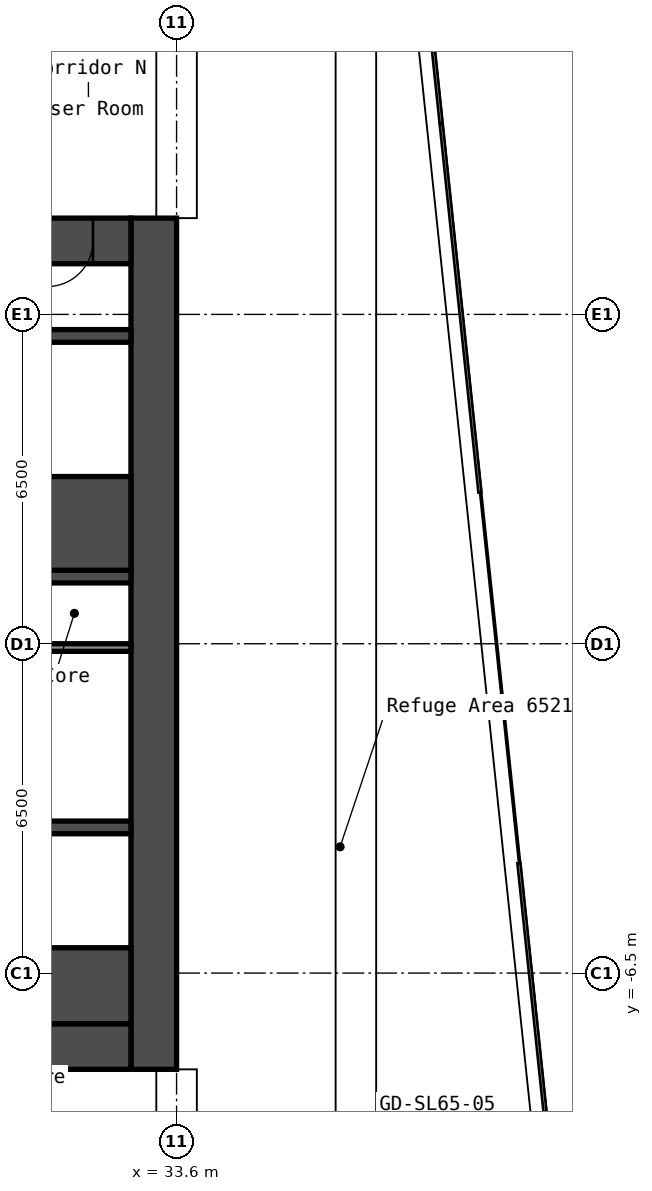
"""IFC4 building model, lengths in metres.
Left out: names, types, materials, properties, quantities, classifications, styles, units other than length and angle.
Written with IfcOpenShell. Run it as: python <this file> out.ifc"""

import sys

from ifc_helpers import new_model, si_unit, direction, frame, frame_2d, origin, place, context, subcontext, project, spatial, rectangle, extrude, element, fill, save


model = new_model("IFC4")
c1 = context("Model", 3, precision=1e-05, world=origin(), true_north=direction((0.0, 1.0)))
c2 = subcontext(c1, "Body", "Model", "MODEL_VIEW")
j1 = project(units=[si_unit("LENGTHUNIT", "METRE"), si_unit("PLANEANGLEUNIT", "RADIAN")], contexts=[c1])
p1 = place(None, origin())
s1 = spatial("IfcSite", under=j1, at=p1, CompositionType="ELEMENT")
p2 = place(p1, origin())
s2 = spatial("IfcBuilding", under=s1, at=p2, CompositionType="ELEMENT")
p3 = place(p2, frame((0.0, 0.0, 228.2)))
s3 = spatial("IfcBuildingStorey", under=s2, at=p3, CompositionType="ELEMENT", Elevation=228.2)
p4 = place(p3, frame((33.15, -8.4, 0.0), z_axis=(0.0, 0.0, 1.0), x_axis=(0.0, 1.0, 0.0)))
e1 = element("IfcWall", 1, at=p4, inside=s3, PredefinedType="SHEAR", context=c2, shape_type="SweptSolid", body=[
    extrude(rectangle(XDim=16.8, YDim=0.9, at=frame_2d((8.4, 0.0))), origin(), (0.0, 0.0, 1.0), 4.1),
])
p5 = place(p3, frame((17.7, 7.95, 0.0), z_axis=(0.0, 0.0, 1.0), x_axis=(1.0, 0.0, 0.0)))
e2 = element("IfcWall", 2, at=p5, inside=s3, PredefinedType="SHEAR", context=c2, shape_type="SweptSolid", body=[
    extrude(rectangle(XDim=15.0, YDim=0.9, at=frame_2d((7.5, 0.0))), origin(), (0.0, 0.0, 1.0), 4.1),
])
p6 = place(p5, frame((10.4, 0.0, 0.0)))
e3 = element("IfcOpeningElement", 3, at=p6, cuts=e2, PredefinedType="OPENING", context=c2, shape_type="SweptSolid", body=[
    extrude(rectangle(XDim=1.2, YDim=2.1, at=frame_2d((0.6, 1.05))), frame((0.0, 0.46, 0.0), z_axis=(0.0, -1.0, 0.0), x_axis=(1.0, 0.0, 0.0)), (0.0, 0.0, 1.0), 0.92),
])
p7 = place(p5, frame((13.35, 0.0, 0.0)))
e4 = element("IfcOpeningElement", 4, at=p7, cuts=e2, PredefinedType="OPENING", context=c2, shape_type="SweptSolid", body=[
    extrude(rectangle(XDim=0.9, YDim=2.1, at=frame_2d((0.45, 1.05))), frame((0.0, 0.46, 0.0), z_axis=(0.0, -1.0, 0.0), x_axis=(1.0, 0.0, 0.0)), (0.0, 0.0, 1.0), 0.92),
])
p8 = place(p3, frame((17.7, -7.95, 0.0), z_axis=(0.0, 0.0, 1.0), x_axis=(1.0, 0.0, 0.0)))
e5 = element("IfcWall", 5, at=p8, inside=s3, PredefinedType="SHEAR", context=c2, shape_type="SweptSolid", body=[
    extrude(rectangle(XDim=15.0, YDim=0.9, at=frame_2d((7.5, 0.0))), origin(), (0.0, 0.0, 1.0), 4.1),
])
p9 = place(p8, frame((2.55, 0.0, 0.0)))
e6 = element("IfcOpeningElement", 6, at=p9, cuts=e5, PredefinedType="OPENING", context=c2, shape_type="SweptSolid", body=[
    extrude(rectangle(XDim=1.0, YDim=2.1, at=frame_2d((0.5, 1.05))), frame((0.0, 0.46, 0.0), z_axis=(0.0, -1.0, 0.0), x_axis=(1.0, 0.0, 0.0)), (0.0, 0.0, 1.0), 0.92),
])
p10 = place(p3, frame((27.65, 1.325, 0.0), z_axis=(0.0, 0.0, 1.0), x_axis=(1.0, 0.0, 0.0)))
e7 = element("IfcWall", 7, at=p10, inside=s3, PredefinedType="SHEAR", context=c2, shape_type="SweptSolid", body=[
    extrude(rectangle(XDim=5.05, YDim=0.25, at=frame_2d((2.525, 0.0))), origin(), (0.0, 0.0, 1.0), 4.1),
])
p11 = place(p10, frame((0.55, 0.0, 0.0)))
e8 = element("IfcOpeningElement", 8, at=p11, cuts=e7, PredefinedType="OPENING", context=c2, shape_type="SweptSolid", body=[
    extrude(rectangle(XDim=1.2, YDim=2.1, at=frame_2d((0.6, 1.05))), frame((0.0, 0.135, 0.0), z_axis=(0.0, -1.0, 0.0), x_axis=(1.0, 0.0, 0.0)), (0.0, 0.0, 1.0), 0.27),
])
p12 = place(p3, frame((30.3, 2.375, 0.0), z_axis=(0.0, 0.0, 1.0), x_axis=(1.0, 0.0, 0.0)))
e9 = element("IfcWall", 9, at=p12, inside=s3, PredefinedType="SHEAR", context=c2, shape_type="SweptSolid", body=[
    extrude(rectangle(XDim=2.4, YDim=1.85, at=frame_2d((1.2, 0.0))), origin(), (0.0, 0.0, 1.0), 4.1),
])
p13 = place(p3, frame((30.3, 6.075, 0.0), z_axis=(0.0, 0.0, 1.0), x_axis=(1.0, 0.0, 0.0)))
e10 = element("IfcWall", 10, at=p13, inside=s3, PredefinedType="SHEAR", context=c2, shape_type="SweptSolid", body=[
    extrude(rectangle(XDim=2.4, YDim=0.25, at=frame_2d((1.2, 0.0))), origin(), (0.0, 0.0, 1.0), 4.1),
])
p14 = place(p3, frame((28.15, -3.625, 0.0), z_axis=(0.0, 0.0, 1.0), x_axis=(1.0, 0.0, 0.0)))
e11 = element("IfcWall", 11, at=p14, inside=s3, PredefinedType="SHEAR", context=c2, shape_type="SweptSolid", body=[
    extrude(rectangle(XDim=4.55, YDim=0.25, at=frame_2d((2.275, 0.0))), origin(), (0.0, 0.0, 1.0), 4.1),
])
p15 = place(p3, frame((28.15, -6.75, 0.0), z_axis=(0.0, 0.0, 1.0), x_axis=(1.0, 0.0, 0.0)))
e12 = element("IfcWall", 12, at=p15, inside=s3, PredefinedType="SHEAR", context=c2, shape_type="SweptSolid", body=[
    extrude(rectangle(XDim=4.55, YDim=1.5, at=frame_2d((2.275, 0.0))), origin(), (0.0, 0.0, 1.0), 4.1),
])
p16 = place(p3, frame((29.7, -0.075, 0.0), z_axis=(0.0, 0.0, 1.0), x_axis=(1.0, 0.0, 0.0)))
e13 = element("IfcWall", 13, at=p16, inside=s3, PredefinedType="PARTITIONING", context=c2, shape_type="SweptSolid", body=[
    extrude(rectangle(XDim=3.0, YDim=0.15, at=frame_2d((1.5, 0.0))), origin(), (0.0, 0.0, 1.0), 4.1),
])
p17 = place(p3, frame((16.048, 10.533, 0.0), z_axis=(0.0, 0.0, 1.0), x_axis=(0.994521812173, 0.104529254816, 0.0)))
e14 = element("IfcWall", 14, at=p17, inside=s3, PredefinedType="PARTITIONING", context=c2, shape_type="SweptSolid", body=[
    extrude(rectangle(XDim=22.635, YDim=0.2, at=frame_2d((11.317, 0.0))), origin(), (0.0, 0.0, 1.0), 4.1),
])
p18 = place(p17, frame((1.82, 0.0, 0.0)))
e15 = element("IfcOpeningElement", 15, at=p18, cuts=e14, PredefinedType="OPENING", context=c2, shape_type="SweptSolid", body=[
    extrude(rectangle(XDim=0.9, YDim=2.1, at=frame_2d((0.45, 1.05))), frame((0.0, 0.11, 0.0), z_axis=(0.0, -1.0, 0.0), x_axis=(1.0, 0.0, 0.0)), (0.0, 0.0, 1.0), 0.22),
])
p19 = place(p17, frame((6.02, 0.0, 0.0)))
e16 = element("IfcOpeningElement", 16, at=p19, cuts=e14, PredefinedType="OPENING", context=c2, shape_type="SweptSolid", body=[
    extrude(rectangle(XDim=0.9, YDim=2.1, at=frame_2d((0.45, 1.05))), frame((0.0, 0.11, 0.0), z_axis=(0.0, -1.0, 0.0), x_axis=(1.0, 0.0, 0.0)), (0.0, 0.0, 1.0), 0.22),
])
p20 = place(p17, frame((11.8, 0.0, 0.0)))
e17 = element("IfcOpeningElement", 17, at=p20, cuts=e14, PredefinedType="OPENING", context=c2, shape_type="SweptSolid", body=[
    extrude(rectangle(XDim=1.6, YDim=2.1, at=frame_2d((0.8, 1.05))), frame((0.0, 0.11, 0.0), z_axis=(0.0, -1.0, 0.0), x_axis=(1.0, 0.0, 0.0)), (0.0, 0.0, 1.0), 0.22),
])
p21 = place(p17, frame((19.117, 0.0, 0.0)))
e18 = element("IfcOpeningElement", 18, at=p21, cuts=e14, PredefinedType="OPENING", context=c2, shape_type="SweptSolid", body=[
    extrude(rectangle(XDim=0.9, YDim=2.1, at=frame_2d((0.45, 1.05))), frame((0.0, 0.11, 0.0), z_axis=(0.0, -1.0, 0.0), x_axis=(1.0, 0.0, 0.0)), (0.0, 0.0, 1.0), 0.22),
])
p22 = place(p7, origin())
e19 = element("IfcDoor", 19, at=p22, inside=s3, OperationType="SINGLE_SWING_LEFT", PredefinedType="DOOR", context=c2, shape_type="SweptSolid", body=[
    extrude(rectangle(XDim=0.9, YDim=2.1, at=frame_2d((0.45, 1.05))), frame((0.0, 0.025, 0.0), z_axis=(0.0, -1.0, 0.0), x_axis=(1.0, 0.0, 0.0)), (0.0, 0.0, 1.0), 0.05),
])
fill(e4, e19)
save(model, sys.argv[1])
